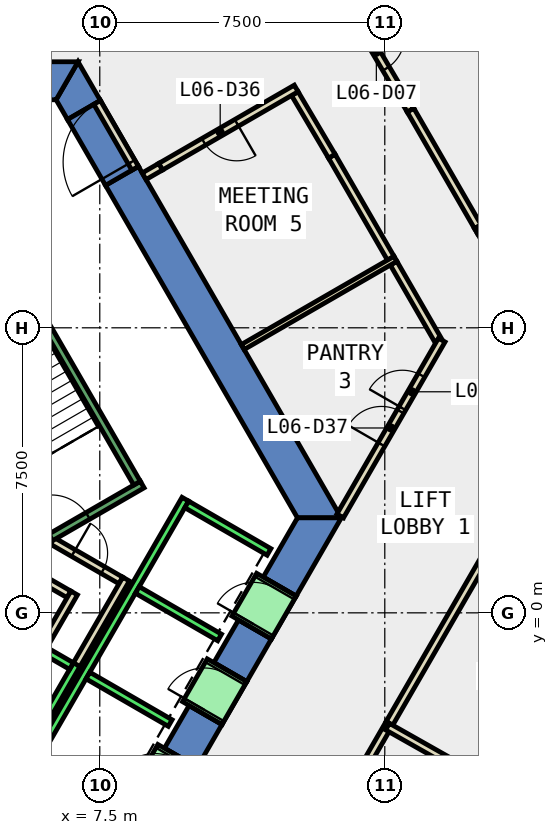
"""IFC4 building model, lengths in metres.
Left out: names, types, materials, properties, quantities, classifications, styles, units other than length and angle.
Written with IfcOpenShell. Run it as: python <this file> out.ifc"""

import sys

from ifc_helpers import new_model, si_unit, direction, frame, frame_2d, origin, place, context, subcontext, project, spatial, polyline, rectangle, outline, extrude, element, fill, save


model = new_model("IFC4")
c1 = context("Model", 3, precision=1e-05, world=origin(), true_north=direction((0.0, 1.0)))
c2 = subcontext(c1, "Body", "Model", "MODEL_VIEW")
j1 = project(units=[si_unit("LENGTHUNIT", "METRE"), si_unit("PLANEANGLEUNIT", "RADIAN")], contexts=[c1])
p1 = place(None, origin())
s1 = spatial("IfcSite", under=j1, at=p1, CompositionType="ELEMENT")
p2 = place(p1, origin())
s2 = spatial("IfcBuilding", under=s1, at=p2, CompositionType="ELEMENT")
p3 = place(p2, frame((0.0, 0.0, 35.0)))
s3 = spatial("IfcBuildingStorey", under=s2, at=p3, CompositionType="ELEMENT", Elevation=35.0)
p4 = place(p3, frame((0.0, 0.0, -0.6)))
e1 = element("IfcWall", 1, at=p4, inside=s3, PredefinedType="SHEAR", context=c2, shape_type="SweptSolid", body=[
    extrude(outline(polyline([(8.517, 11.748), (7.651, 11.248), (12.702, 2.5), (13.856, 2.5), (8.517, 11.748)])), origin(), (0.0, 0.0, 1.0), 4.4),
])
p5 = place(p3, frame((0.0, 0.0, -0.6)))
e2 = element("IfcWall", 2, at=p5, inside=s3, PredefinedType="SHEAR", context=c2, shape_type="SweptSolid", body=[
    extrude(outline(polyline([(6.651, 12.98), (7.517, 13.48), (6.928, 14.5), (6.351, 13.5), (6.651, 12.98)])), origin(), (0.0, 0.0, 1.0), 4.4),
])
p6 = place(p3, frame((0.0, 0.0, 3.6)))
e3 = element("IfcWall", 3, at=p6, inside=s3, PredefinedType="SHEAR", context=c2, shape_type="SweptSolid", body=[
    extrude(outline(polyline([(7.517, 13.48), (6.651, 12.98), (7.651, 11.248), (8.517, 11.748), (7.517, 13.48)])), origin(), (0.0, 0.0, 1.0), 0.2),
])
p7 = place(p3, frame((0.0, 0.0, -0.6)))
e4 = element("IfcWall", 4, at=p7, inside=s3, PredefinedType="SHEAR", context=c2, shape_type="SweptSolid", body=[
    extrude(outline(polyline([(4.55, 14.5), (4.55, 13.5), (6.351, 13.5), (6.928, 14.5), (4.55, 14.5)])), origin(), (0.0, 0.0, 1.0), 4.4),
])
p8 = place(p3, frame((0.0, 0.0, -0.6)))
e5 = element("IfcWall", 5, at=p8, inside=s3, PredefinedType="SHEAR", context=c2, shape_type="SweptSolid", body=[
    extrude(outline(polyline([(10.717, -2.937), (9.851, -2.437), (9.201, -3.563), (10.067, -4.063), (10.717, -2.937)])), origin(), (0.0, 0.0, 1.0), 4.4),
])
p9 = place(p3, frame((0.0, 0.0, -0.6)))
e6 = element("IfcWall", 6, at=p9, inside=s3, PredefinedType="SHEAR", context=c2, shape_type="SweptSolid", body=[
    extrude(outline(polyline([(12.017, -0.686), (11.151, -0.186), (10.501, -1.311), (11.367, -1.811), (12.017, -0.686)])), origin(), (0.0, 0.0, 1.0), 4.4),
])
p10 = place(p3, frame((0.0, 0.0, -0.6)))
e7 = element("IfcWall", 7, at=p10, inside=s3, PredefinedType="SHEAR", context=c2, shape_type="SweptSolid", body=[
    extrude(outline(polyline([(11.801, 0.94), (12.667, 0.44), (13.856, 2.5), (12.702, 2.5), (11.801, 0.94)])), origin(), (0.0, 0.0, 1.0), 4.4),
])
p11 = place(p3, frame((0.0, 0.0, 3.6)))
e8 = element("IfcWall", 8, at=p11, inside=s3, PredefinedType="SHEAR", context=c2, shape_type="SweptSolid", body=[
    extrude(outline(polyline([(10.067, -4.063), (9.201, -3.563), (8.551, -4.689), (9.417, -5.189), (10.067, -4.063)])), origin(), (0.0, 0.0, 1.0), 0.2),
])
p12 = place(p3, frame((0.0, 0.0, 3.6)))
e9 = element("IfcWall", 9, at=p12, inside=s3, PredefinedType="SHEAR", context=c2, shape_type="SweptSolid", body=[
    extrude(outline(polyline([(11.367, -1.811), (10.501, -1.311), (9.851, -2.437), (10.717, -2.937), (11.367, -1.811)])), origin(), (0.0, 0.0, 1.0), 0.2),
])
p13 = place(p3, frame((0.0, 0.0, 3.6)))
e10 = element("IfcWall", 10, at=p13, inside=s3, PredefinedType="SHEAR", context=c2, shape_type="SweptSolid", body=[
    extrude(outline(polyline([(12.667, 0.44), (11.801, 0.94), (11.151, -0.186), (12.017, -0.686), (12.667, 0.44)])), origin(), (0.0, 0.0, 1.0), 0.2),
])
p14 = place(p3, frame((15.157, 9.33, 0.0), z_axis=(0.0, 0.0, 1.0), x_axis=(-0.500058580706, 0.865991579556, 0.0)))
e11 = element("IfcWall", 11, at=p14, inside=s3, PredefinedType="PARTITIONING", context=c2, shape_type="SweptSolid", body=[
    extrude(rectangle(XDim=3.102, YDim=0.2, at=frame_2d((1.551, 0.0))), origin(), (0.0, 0.0, 1.0), 3.8),
])
p15 = place(p3, frame((13.606, 12.016, 0.0), z_axis=(0.0, 0.0, 1.0), x_axis=(-0.508832553058, 0.860865513857, 0.0)))
e12 = element("IfcWall", 12, at=p15, inside=s3, PredefinedType="PARTITIONING", context=c2, shape_type="SweptSolid", body=[
    extrude(rectangle(XDim=1.912, YDim=0.2, at=frame_2d((0.956, 0.0))), origin(), (0.0, 0.0, 1.0), 3.8),
])
p16 = place(p3, frame((12.669, 13.799, 0.0), z_axis=(0.0, 0.0, 1.0), x_axis=(-0.865966559136, -0.500101908074, 0.0)))
e13 = element("IfcWall", 13, at=p16, inside=s3, PredefinedType="PARTITIONING", context=c2, shape_type="SweptSolid", body=[
    extrude(rectangle(XDim=4.121, YDim=0.2, at=frame_2d((2.061, 0.0))), origin(), (0.0, 0.0, 1.0), 3.8),
])
p17 = place(p16, frame((1.81, 0.0, 0.0)))
e14 = element("IfcOpeningElement", 14, at=p17, cuts=e13, PredefinedType="OPENING", context=c2, shape_type="SweptSolid", body=[
    extrude(rectangle(XDim=1.0, YDim=2.1, at=frame_2d((0.5, 1.05))), frame((0.0, 0.11, 0.0), z_axis=(0.0, -1.0, 0.0), x_axis=(1.0, 0.0, 0.0)), (0.0, 0.0, 1.0), 0.22),
])
p18 = place(p3, frame((16.399, 7.178, 0.0), z_axis=(0.0, 0.0, 1.0), x_axis=(-0.499873332494, 0.866098522953, 0.0)))
e15 = element("IfcWall", 15, at=p18, inside=s3, PredefinedType="PARTITIONING", context=c2, shape_type="SweptSolid", body=[
    extrude(rectangle(XDim=2.334, YDim=0.2, at=frame_2d((1.167, 0.0))), origin(), (0.0, 0.0, 1.0), 3.8),
])
p19 = place(p3, frame((17.524, 10.031, 0.0), z_axis=(0.0, 0.0, 1.0), x_axis=(0.499861717316, -0.86610522661, 0.0)))
e16 = element("IfcWall", 16, at=p19, inside=s3, PredefinedType="PARTITIONING", context=c2, shape_type="SweptSolid", body=[
    extrude(rectangle(XDim=3.541, YDim=0.2, at=frame_2d((1.771, 0.0))), origin(), (0.0, 0.0, 1.0), 3.8),
])
p20 = place(p19, frame((1.27, 0.0, 0.0)))
e17 = element("IfcOpeningElement", 17, at=p20, cuts=e16, PredefinedType="OPENING", context=c2, shape_type="SweptSolid", body=[
    extrude(rectangle(XDim=1.0, YDim=2.1, at=frame_2d((0.5, 1.05))), frame((0.0, 0.11, 0.0), z_axis=(0.0, -1.0, 0.0), x_axis=(1.0, 0.0, 0.0)), (0.0, 0.0, 1.0), 0.22),
])
p21 = place(p3, frame((13.877, 16.275, 0.0), z_axis=(0.0, 0.0, 1.0), x_axis=(0.508613166028, -0.860995149431, 0.0)))
e18 = element("IfcWall", 18, at=p21, inside=s3, PredefinedType="PARTITIONING", context=c2, shape_type="SweptSolid", body=[
    extrude(rectangle(XDim=3.541, YDim=0.2, at=frame_2d((1.771, 0.0))), origin(), (0.0, 0.0, 1.0), 3.8),
])
p22 = place(p21, frame((1.271, 0.0, 0.0)))
e19 = element("IfcOpeningElement", 19, at=p22, cuts=e18, PredefinedType="OPENING", context=c2, shape_type="SweptSolid", body=[
    extrude(rectangle(XDim=1.0, YDim=2.1, at=frame_2d((0.5, 1.05))), frame((0.0, 0.11, 0.0), z_axis=(0.0, -1.0, 0.0), x_axis=(1.0, 0.0, 0.0)), (0.0, 0.0, 1.0), 0.22),
])
p23 = place(p3, frame((15.678, 13.226, 0.0), z_axis=(0.0, 0.0, 1.0), x_axis=(0.499951278228, -0.866053531485, 0.0)))
e20 = element("IfcWall", 20, at=p23, inside=s3, PredefinedType="PARTITIONING", context=c2, shape_type="SweptSolid", body=[
    extrude(rectangle(XDim=3.54, YDim=0.2, at=frame_2d((1.77, 0.0))), origin(), (0.0, 0.0, 1.0), 3.8),
])
p24 = place(p3, frame((5.499, 1.172, 0.0), z_axis=(0.0, 0.0, 1.0), x_axis=(0.866333505267, -0.499465972466, 0.0)))
e21 = element("IfcWall", 21, at=p24, inside=s3, PredefinedType="PARTITIONING", context=c2, shape_type="SweptSolid", body=[
    extrude(rectangle(XDim=1.374, YDim=0.2, at=frame_2d((0.687, 0.0))), origin(), (0.0, 0.0, 1.0), 3.8),
])
p25 = place(p3, frame((6.826, 0.522, 0.0), z_axis=(0.0, 0.0, 1.0), x_axis=(-0.500016722714, -0.866015748706, 0.0)))
e22 = element("IfcWall", 22, at=p25, inside=s3, PredefinedType="PARTITIONING", context=c2, shape_type="SweptSolid", body=[
    extrude(rectangle(XDim=1.7, YDim=0.2, at=frame_2d((0.85, 0.0))), origin(), (0.0, 0.0, 1.0), 3.8),
])
p26 = place(p3, frame((6.25, 1.894, 0.0), z_axis=(0.0, 0.0, 1.0), x_axis=(0.866043184279, -0.499969202016, 0.0)))
e23 = element("IfcWall", 23, at=p26, inside=s3, PredefinedType="PARTITIONING", context=c2, shape_type="SweptSolid", body=[
    extrude(rectangle(XDim=2.084, YDim=0.2, at=frame_2d((1.042, 0.0))), origin(), (0.0, 0.0, 1.0), 3.8),
])
p27 = place(p26, frame((0.642, 0.0, 0.0)))
e24 = element("IfcOpeningElement", 24, at=p27, cuts=e23, PredefinedType="OPENING", context=c2, shape_type="SweptSolid", body=[
    extrude(rectangle(XDim=0.9, YDim=2.1, at=frame_2d((0.45, 1.05))), frame((0.0, 0.11, 0.0), z_axis=(0.0, -1.0, 0.0), x_axis=(1.0, 0.0, 0.0)), (0.0, 0.0, 1.0), 0.22),
])
p28 = place(p3, frame((8.192, 0.888, 0.0), z_axis=(0.0, 0.0, 1.0), x_axis=(-0.499940625693, -0.866059680843, 0.0)))
e25 = element("IfcWall", 25, at=p28, inside=s3, PredefinedType="PARTITIONING", context=c2, shape_type="SweptSolid", body=[
    extrude(rectangle(XDim=2.68, YDim=0.2, at=frame_2d((1.34, 0.0))), origin(), (0.0, 0.0, 1.0), 3.8),
])
p29 = place(p3, frame((15.281, 9.315, 0.0), z_axis=(0.0, 0.0, 1.0), x_axis=(-0.86601742213, -0.500013824377, 0.0)))
e26 = element("IfcWall", 26, at=p29, inside=s3, PredefinedType="PARTITIONING", context=c2, shape_type="SweptSolid", body=[
    extrude(rectangle(XDim=4.642, YDim=0.15, at=frame_2d((2.321, 0.0))), origin(), (0.0, 0.0, 1.0), 3.8),
])
p30 = place(p3, frame((13.827, 2.55, 0.0), z_axis=(0.0, 0.0, 1.0), x_axis=(0.50002563942, 0.866010600352, 0.0)))
e27 = element("IfcWall", 27, at=p30, inside=s3, PredefinedType="PARTITIONING", context=c2, shape_type="SweptSolid", body=[
    extrude(rectangle(XDim=5.344, YDim=0.2, at=frame_2d((2.672, 0.0))), origin(), (0.0, 0.0, 1.0), 3.8),
])
p31 = place(p30, frame((2.172, 0.0, 0.0)))
e28 = element("IfcOpeningElement", 28, at=p31, cuts=e27, PredefinedType="OPENING", context=c2, shape_type="SweptSolid", body=[
    extrude(rectangle(XDim=1.0, YDim=2.1, at=frame_2d((0.5, 1.05))), frame((0.0, 0.11, 0.0), z_axis=(0.0, -1.0, 0.0), x_axis=(1.0, 0.0, 0.0)), (0.0, 0.0, 1.0), 0.22),
])
p32 = place(p30, frame((3.272, 0.0, 0.0)))
e29 = element("IfcOpeningElement", 29, at=p32, cuts=e27, PredefinedType="OPENING", context=c2, shape_type="SweptSolid", body=[
    extrude(rectangle(XDim=1.0, YDim=2.1, at=frame_2d((0.5, 1.05))), frame((0.0, 0.11, 0.0), z_axis=(0.0, -1.0, 0.0), x_axis=(1.0, 0.0, 0.0)), (0.0, 0.0, 1.0), 0.22),
])
p33 = place(p3, frame((15.122, -2.908, 0.0), z_axis=(0.0, 0.0, 1.0), x_axis=(-0.499922740561, -0.866070004948, 0.0)))
e30 = element("IfcWall", 30, at=p33, inside=s3, PredefinedType="PARTITIONING", context=c2, shape_type="SweptSolid", body=[
    extrude(rectangle(XDim=4.643, YDim=0.2, at=frame_2d((2.321, 0.0))), origin(), (0.0, 0.0, 1.0), 3.8),
])
p34 = place(p3, frame((18.705, 3.298, 0.0), z_axis=(0.0, 0.0, 1.0), x_axis=(-0.499993769413, -0.866029000986, 0.0)))
e31 = element("IfcWall", 31, at=p34, inside=s3, PredefinedType="PARTITIONING", context=c2, shape_type="SweptSolid", body=[
    extrude(rectangle(XDim=7.166, YDim=0.2, at=frame_2d((3.583, 0.0))), origin(), (0.0, 0.0, 1.0), 3.8),
])
p35 = place(p3, frame((15.072, -2.994, 0.0), z_axis=(0.0, 0.0, 1.0), x_axis=(0.87054185148, -0.49209438609, 0.0)))
e32 = element("IfcWall", 32, at=p35, inside=s3, PredefinedType="PARTITIONING", context=c2, shape_type="SweptSolid", body=[
    extrude(rectangle(XDim=9.1, YDim=0.2, at=frame_2d((4.55, 0.0))), origin(), (0.0, 0.0, 1.0), 3.8),
])
p36 = place(p3, frame((17.399, 10.045, 0.0), z_axis=(0.0, 0.0, 1.0), x_axis=(0.865980803489, 0.500077242023, 0.0)))
e33 = element("IfcWall", 33, at=p36, inside=s3, PredefinedType="PARTITIONING", context=c2, shape_type="SweptSolid", body=[
    extrude(rectangle(XDim=8.101, YDim=0.15, at=frame_2d((4.05, 0.0))), origin(), (0.0, 0.0, 1.0), 3.8),
])
p37 = place(p3, frame((8.43, 11.698, 0.0), z_axis=(0.0, 0.0, 1.0), x_axis=(-0.50002537861, 0.866010750942, 0.0)))
e34 = element("IfcWall", 34, at=p37, inside=s3, PredefinedType="PARTITIONING", context=c2, shape_type="SweptSolid", body=[
    extrude(rectangle(XDim=2.0, YDim=0.2, at=frame_2d((1.0, 0.0))), origin(), (0.0, 0.0, 1.0), 2.4),
])
p38 = place(p37, frame((0.19, 0.0, 0.0)))
e35 = element("IfcOpeningElement", 35, at=p38, cuts=e34, PredefinedType="OPENING", context=c2, shape_type="SweptSolid", body=[
    extrude(rectangle(XDim=1.8, YDim=2.1, at=frame_2d((0.9, 1.05))), frame((0.0, 0.11, 0.0), z_axis=(0.0, -1.0, 0.0), x_axis=(1.0, 0.0, 0.0)), (0.0, 0.0, 1.0), 0.22),
])
p39 = place(p3, frame((9.1, 11.738, 0.0), z_axis=(0.0, 0.0, 1.0), x_axis=(-0.866071776036, -0.499919672301, 0.0)))
e36 = element("IfcWall", 36, at=p39, inside=s3, PredefinedType="PARTITIONING", context=c2, shape_type="SweptSolid", body=[
    extrude(rectangle(XDim=0.5, YDim=0.2, at=frame_2d((0.25, 0.0))), origin(), (0.0, 0.0, 1.0), 2.4),
])
p40 = place(p3, frame((5.492, -3.788, 0.0), z_axis=(0.0, 0.0, 1.0), x_axis=(0.500011755427, 0.866018616679, 0.0)))
e37 = element("IfcWall", 37, at=p40, inside=s3, PredefinedType="STANDARD", context=c2, shape_type="SweptSolid", body=[
    extrude(rectangle(XDim=2.8, YDim=0.2, at=frame_2d((1.4, 0.0))), origin(), (0.0, 0.0, 1.0), 3.8),
])
p41 = place(p3, frame((4.677, -0.2, 0.0), z_axis=(0.0, 0.0, 1.0), x_axis=(0.865973769406, -0.500089422704, 0.0)))
e38 = element("IfcWall", 38, at=p41, inside=s3, PredefinedType="STANDARD", context=c2, shape_type="SweptSolid", body=[
    extrude(rectangle(XDim=2.399, YDim=0.2, at=frame_2d((1.2, 0.0))), origin(), (0.0, 0.0, 1.0), 3.8),
])
p42 = place(p3, frame((4.451, -6.19, 0.0), z_axis=(0.0, 0.0, 1.0), x_axis=(0.50000090737, 0.866024879913, 0.0)))
e39 = element("IfcWall", 39, at=p42, inside=s3, PredefinedType="STANDARD", context=c2, shape_type="SweptSolid", body=[
    extrude(rectangle(XDim=10.6, YDim=0.2, at=frame_2d((5.3, 0.0))), origin(), (0.0, 0.0, 1.0), 3.8),
])
for number, where, z_axis, x_axis in (
    (40, (7.188, -1.65, 0.0), (0.0, 0.0, 1.0), (0.866, -0.5, 0.0)),
    (41, (8.488, 0.602, 0.0), (0.0, 0.0, 1.0), (0.866, -0.5, 0.0)),
):
    element("IfcWall", number, at=place(p3, frame(where, z_axis=z_axis, x_axis=x_axis)), inside=s3, PredefinedType="STANDARD", context=c2, shape_type="SweptSolid", body=[
        extrude(rectangle(XDim=2.5, YDim=0.2, at=frame_2d((1.25, 0.0))), origin(), (0.0, 0.0, 1.0), 3.8),
    ])
p43 = place(p3, frame((9.788, 2.853, 0.0), z_axis=(0.0, 0.0, 1.0), x_axis=(0.865998541277, -0.500046524342, 0.0)))
e42 = element("IfcWall", 42, at=p43, inside=s3, PredefinedType="STANDARD", context=c2, shape_type="SweptSolid", body=[
    extrude(rectangle(XDim=2.5, YDim=0.2, at=frame_2d((1.25, 0.0))), origin(), (0.0, 0.0, 1.0), 3.8),
])
p44 = place(p3, frame((8.898, -4.889, 0.0), z_axis=(0.0, 0.0, 1.0), x_axis=(0.500036693733, 0.866004217611, 0.0)))
e43 = element("IfcWall", 43, at=p44, inside=s3, PredefinedType="STANDARD", context=c2, shape_type="SweptSolid", body=[
    extrude(rectangle(XDim=1.3, YDim=1.2, at=frame_2d((0.65, 0.0))), origin(), (0.0, 0.0, 1.0), 2.4),
])
p45 = place(p44, frame((0.1, 0.0, 0.0)))
e44 = element("IfcOpeningElement", 44, at=p45, cuts=e43, PredefinedType="OPENING", context=c2, shape_type="SweptSolid", body=[
    extrude(rectangle(XDim=1.1, YDim=2.3, at=frame_2d((0.55, 1.15))), frame((0.0, 0.61, 0.0), z_axis=(0.0, -1.0, 0.0), x_axis=(1.0, 0.0, 0.0)), (0.0, 0.0, 1.0), 1.22),
])
p46 = place(p3, frame((10.198, -2.637, 0.0), z_axis=(0.0, 0.0, 1.0), x_axis=(0.49989585183, 0.866085525409, 0.0)))
e45 = element("IfcWall", 45, at=p46, inside=s3, PredefinedType="STANDARD", context=c2, shape_type="SweptSolid", body=[
    extrude(rectangle(XDim=1.3, YDim=1.2, at=frame_2d((0.65, 0.0))), origin(), (0.0, 0.0, 1.0), 2.4),
])
p47 = place(p46, frame((0.1, 0.0, 0.0)))
e46 = element("IfcOpeningElement", 46, at=p47, cuts=e45, PredefinedType="OPENING", context=c2, shape_type="SweptSolid", body=[
    extrude(rectangle(XDim=1.1, YDim=2.3, at=frame_2d((0.55, 1.15))), frame((0.0, 0.61, 0.0), z_axis=(0.0, -1.0, 0.0), x_axis=(1.0, 0.0, 0.0)), (0.0, 0.0, 1.0), 1.22),
])
p48 = place(p3, frame((11.498, -0.385, 0.0), z_axis=(0.0, 0.0, 1.0), x_axis=(0.500221244143, 0.865897630733, 0.0)))
e47 = element("IfcWall", 47, at=p48, inside=s3, PredefinedType="STANDARD", context=c2, shape_type="SweptSolid", body=[
    extrude(rectangle(XDim=1.299, YDim=1.2, at=frame_2d((0.65, 0.0))), origin(), (0.0, 0.0, 1.0), 2.4),
])
p49 = place(p48, frame((0.1, 0.0, 0.0)))
e48 = element("IfcOpeningElement", 48, at=p49, cuts=e47, PredefinedType="OPENING", context=c2, shape_type="SweptSolid", body=[
    extrude(rectangle(XDim=1.1, YDim=2.3, at=frame_2d((0.55, 1.15))), frame((0.0, 0.61, 0.0), z_axis=(0.0, -1.0, 0.0), x_axis=(1.0, 0.0, 0.0)), (0.0, 0.0, 1.0), 1.22),
])
p50 = place(p3, frame((4.806, 1.176, 0.0), z_axis=(0.0, 0.0, 1.0), x_axis=(0.866059941101, 0.499940174841, 0.0)))
e49 = element("IfcWall", 49, at=p50, inside=s3, PredefinedType="STANDARD", context=c2, shape_type="SweptSolid", body=[
    extrude(rectangle(XDim=4.4, YDim=0.2, at=frame_2d((2.2, 0.0))), origin(), (0.0, 0.0, 1.0), 3.8),
])
p51 = place(p50, frame((1.65, 0.0, 0.0)))
e50 = element("IfcOpeningElement", 50, at=p51, cuts=e49, PredefinedType="OPENING", context=c2, shape_type="SweptSolid", body=[
    extrude(rectangle(XDim=1.1, YDim=2.2, at=frame_2d((0.55, 1.1))), frame((0.0, 0.11, 0.0), z_axis=(0.0, -1.0, 0.0), x_axis=(1.0, 0.0, 0.0)), (0.0, 0.0, 1.0), 0.22),
])
p52 = place(p3, frame((8.48, 3.412, 0.0), z_axis=(0.0, 0.0, 1.0), x_axis=(-0.499978703459, 0.866037698999, 0.0)))
e51 = element("IfcWall", 51, at=p52, inside=s3, PredefinedType="STANDARD", context=c2, shape_type="SweptSolid", body=[
    extrude(rectangle(XDim=6.9, YDim=0.2, at=frame_2d((3.45, 0.0))), origin(), (0.0, 0.0, 1.0), 3.8),
])
p53 = place(p22, origin())
e52 = element("IfcDoor", 52, at=p53, inside=s3, OperationType="SINGLE_SWING_LEFT", PredefinedType="DOOR", context=c2, shape_type="SweptSolid", body=[
    extrude(rectangle(XDim=1.0, YDim=2.1, at=frame_2d((0.5, 1.05))), frame((0.0, 0.025, 0.0), z_axis=(0.0, -1.0, 0.0), x_axis=(1.0, 0.0, 0.0)), (0.0, 0.0, 1.0), 0.05),
])
fill(e19, e52)
p54 = place(p17, origin())
e53 = element("IfcDoor", 53, at=p54, inside=s3, OperationType="SINGLE_SWING_LEFT", PredefinedType="DOOR", context=c2, shape_type="SweptSolid", body=[
    extrude(rectangle(XDim=1.0, YDim=2.1, at=frame_2d((0.5, 1.05))), frame((0.0, 0.025, 0.0), z_axis=(0.0, -1.0, 0.0), x_axis=(1.0, 0.0, 0.0)), (0.0, 0.0, 1.0), 0.05),
])
fill(e14, e53)
p55 = place(p31, origin())
e54 = element("IfcDoor", 54, at=p55, inside=s3, OperationType="SINGLE_SWING_LEFT", PredefinedType="DOOR", context=c2, shape_type="SweptSolid", body=[
    extrude(rectangle(XDim=1.0, YDim=2.1, at=frame_2d((0.5, 1.05))), frame((0.0, 0.025, 0.0), z_axis=(0.0, -1.0, 0.0), x_axis=(1.0, 0.0, 0.0)), (0.0, 0.0, 1.0), 0.05),
])
fill(e28, e54)
p56 = place(p27, origin())
e55 = element("IfcDoor", 55, at=p56, inside=s3, OperationType="SINGLE_SWING_LEFT", PredefinedType="DOOR", context=c2, shape_type="SweptSolid", body=[
    extrude(rectangle(XDim=0.9, YDim=2.1, at=frame_2d((0.45, 1.05))), frame((0.0, 0.025, 0.0), z_axis=(0.0, -1.0, 0.0), x_axis=(1.0, 0.0, 0.0)), (0.0, 0.0, 1.0), 0.05),
])
fill(e24, e55)
p57 = place(p32, origin())
e56 = element("IfcDoor", 56, at=p57, inside=s3, OperationType="SINGLE_SWING_RIGHT", PredefinedType="DOOR", context=c2, shape_type="SweptSolid", body=[
    extrude(rectangle(XDim=1.0, YDim=2.1, at=frame_2d((0.5, 1.05))), frame((0.0, 0.025, 0.0), z_axis=(0.0, -1.0, 0.0), x_axis=(1.0, 0.0, 0.0)), (0.0, 0.0, 1.0), 0.05),
])
fill(e29, e56)
p58 = place(p38, origin())
e57 = element("IfcDoor", 57, at=p58, inside=s3, OperationType="DOUBLE_DOOR_SINGLE_SWING", PredefinedType="DOOR", context=c2, shape_type="SweptSolid", body=[
    extrude(rectangle(XDim=1.8, YDim=2.1, at=frame_2d((0.9, 1.05))), frame((0.0, 0.025, 0.0), z_axis=(0.0, -1.0, 0.0), x_axis=(1.0, 0.0, 0.0)), (0.0, 0.0, 1.0), 0.05),
])
fill(e35, e57)
p59 = place(p47, origin())
e58 = element("IfcDoor", 58, at=p59, inside=s3, OperationType="SLIDING_TO_LEFT", PredefinedType="DOOR", context=c2, shape_type="SweptSolid", body=[
    extrude(rectangle(XDim=1.1, YDim=2.3, at=frame_2d((0.55, 1.15))), frame((0.0, 0.025, 0.0), z_axis=(0.0, -1.0, 0.0), x_axis=(1.0, 0.0, 0.0)), (0.0, 0.0, 1.0), 0.05),
])
fill(e46, e58)
p60 = place(p49, origin())
e59 = element("IfcDoor", 59, at=p60, inside=s3, OperationType="SLIDING_TO_LEFT", PredefinedType="DOOR", context=c2, shape_type="SweptSolid", body=[
    extrude(rectangle(XDim=1.1, YDim=2.3, at=frame_2d((0.55, 1.15))), frame((0.0, 0.025, 0.0), z_axis=(0.0, -1.0, 0.0), x_axis=(1.0, 0.0, 0.0)), (0.0, 0.0, 1.0), 0.05),
])
fill(e48, e59)
p61 = place(p51, origin())
e60 = element("IfcDoor", 60, at=p61, inside=s3, OperationType="SINGLE_SWING_LEFT", PredefinedType="DOOR", context=c2, shape_type="SweptSolid", body=[
    extrude(rectangle(XDim=1.1, YDim=2.2, at=frame_2d((0.55, 1.1))), frame((0.0, 0.025, 0.0), z_axis=(0.0, -1.0, 0.0), x_axis=(1.0, 0.0, 0.0)), (0.0, 0.0, 1.0), 0.05),
])
fill(e50, e60)
save(model, sys.argv[1])
